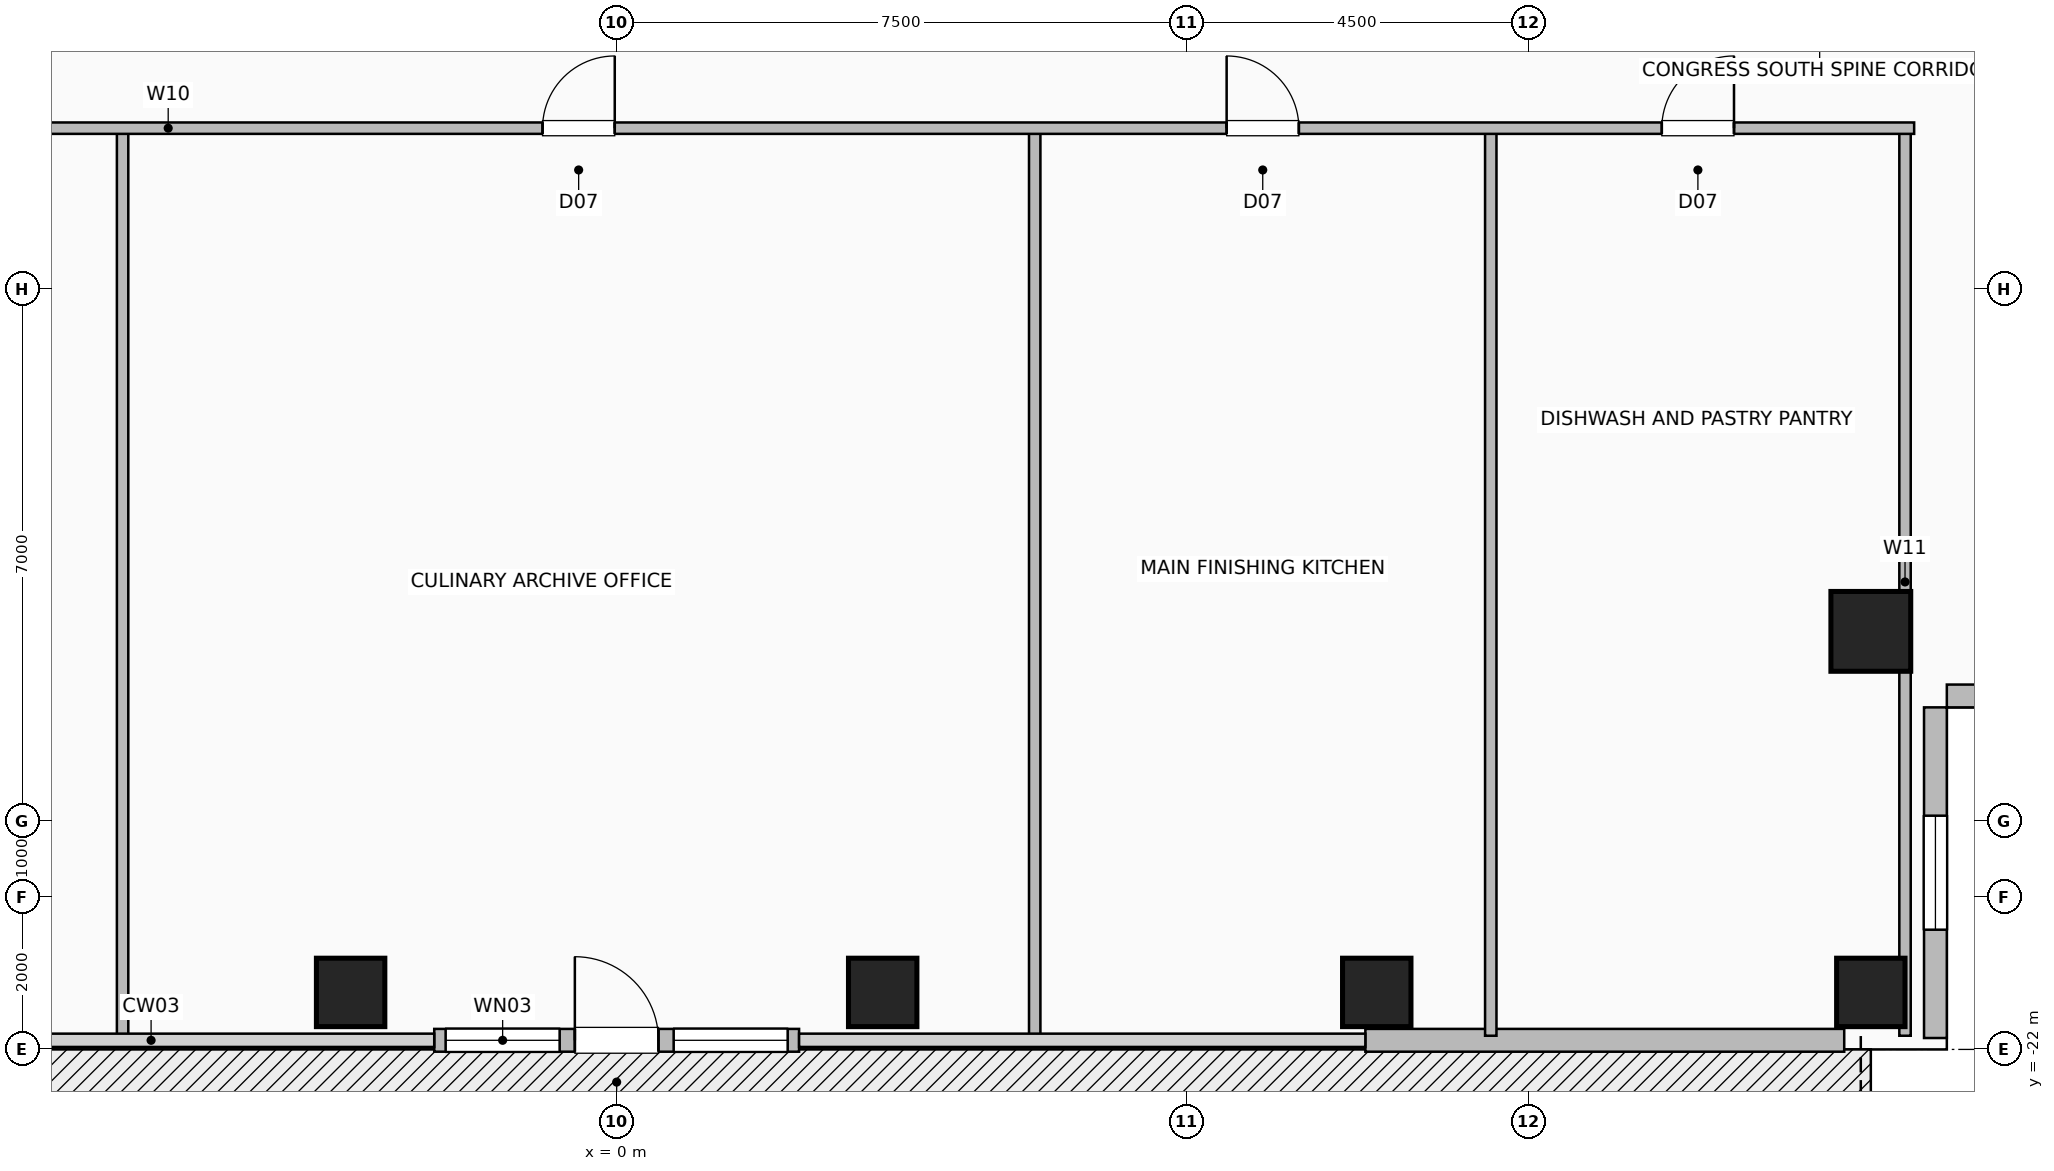
"""IFC4 building model, lengths in metres.
Left out: names, types, materials, properties, quantities, classifications, styles, units other than length and angle.
Written with IfcOpenShell. Run it as: python <this file> out.ifc"""

import sys

from ifc_helpers import new_model, si_unit, direction, frame, frame_2d, origin, origin_2d, place, context, subcontext, project, spatial, rectangle, hollow_rectangle, extrude, element, fill, save


model = new_model("IFC4")
c1 = context("Model", 3, precision=1e-05, world=origin(), true_north=direction((0.0, 1.0)))
c2 = subcontext(c1, "Body", "Model", "MODEL_VIEW")
j1 = project(units=[si_unit("LENGTHUNIT", "METRE"), si_unit("PLANEANGLEUNIT", "RADIAN")], contexts=[c1])
p1 = place(None, origin())
s1 = spatial("IfcSite", under=j1, at=p1, CompositionType="ELEMENT")
p2 = place(p1, origin())
s2 = spatial("IfcBuilding", under=s1, at=p2, CompositionType="ELEMENT")
p3 = place(p2, frame((0.0, 0.0, 122.8)))
s3 = spatial("IfcBuildingStorey", under=s2, at=p3, CompositionType="ELEMENT", Elevation=122.8)
for number, where, z_axis, x_axis in (
    (1, (-3.5, -21.25, 0.0), (0.0, 0.0, 1.0), (1.0, 0.0, 0.0)),
    (2, (3.5, -21.25, 0.0), (0.0, 0.0, 1.0), (1.0, 0.0, 0.0)),
    (3, (10.0, -21.25, 0.0), (0.0, 0.0, 1.0), (1.0, 0.0, 0.0)),
    (4, (16.5, -21.25, 0.0), (0.0, 0.0, 1.0), (1.0, 0.0, 0.0)),
):
    element("IfcColumn", number, at=place(p3, frame(where, z_axis=z_axis, x_axis=x_axis)), inside=s3, PredefinedType="COLUMN", context=c2, shape_type="SweptSolid", body=[
        extrude(hollow_rectangle(XDim=0.9, YDim=0.9, WallThickness=0.045, at=origin_2d()), origin(), (0.0, 0.0, 1.0), 3.6),
    ])
p4 = place(p3, frame((16.5, -16.5, 0.0), z_axis=(0.0, 0.0, 1.0), x_axis=(1.0, 0.0, 0.0)))
e5 = element("IfcColumn", 5, at=p4, inside=s3, PredefinedType="COLUMN", context=c2, shape_type="SweptSolid", body=[
    extrude(hollow_rectangle(XDim=1.05, YDim=1.05, WallThickness=0.05, at=origin_2d()), origin(), (0.0, 0.0, 1.0), 3.6),
])
p5 = place(p3, frame((9.85, -21.88, 0.0), z_axis=(0.0, 0.0, 1.0), x_axis=(1.0, 0.0, 0.0)))
e6 = element("IfcWall", 6, at=p5, inside=s3, PredefinedType="SOLIDWALL", context=c2, shape_type="SweptSolid", body=[
    extrude(rectangle(XDim=6.3, YDim=0.3, at=frame_2d((3.15, 0.0))), origin(), (0.0, 0.0, 1.0), 3.36),
])
p6 = place(p3, frame((-2.4, -21.88, 0.0), z_axis=(0.0, 0.0, 1.0), x_axis=(1.0, 0.0, 0.0)))
e7 = element("IfcWall", 7, at=p6, inside=s3, PredefinedType="SOLIDWALL", context=c2, shape_type="SweptSolid", body=[
    extrude(rectangle(XDim=4.8, YDim=0.3, at=frame_2d((2.4, 0.0))), origin(), (0.0, 0.0, 1.0), 3.36),
])
p7 = place(p6, frame((1.85, 0.0, 0.0)))
e8 = element("IfcOpeningElement", 8, at=p7, cuts=e7, PredefinedType="OPENING", context=c2, shape_type="SweptSolid", body=[
    extrude(rectangle(XDim=1.1, YDim=2.2, at=frame_2d((0.55, 1.1))), frame((0.0, 0.16, 0.0), z_axis=(0.0, -1.0, 0.0), x_axis=(1.0, 0.0, 0.0)), (0.0, 0.0, 1.0), 0.32),
])
p8 = place(p6, frame((0.15, 0.0, 0.85)))
e9 = element("IfcOpeningElement", 9, at=p8, cuts=e7, PredefinedType="OPENING", context=c2, shape_type="SweptSolid", body=[
    extrude(rectangle(XDim=1.5, YDim=1.8, at=frame_2d((0.75, 0.9))), frame((0.0, 0.16, 0.0), z_axis=(0.0, -1.0, 0.0), x_axis=(1.0, 0.0, 0.0)), (0.0, 0.0, 1.0), 0.32),
])
p9 = place(p6, frame((3.15, 0.0, 0.85)))
e10 = element("IfcOpeningElement", 10, at=p9, cuts=e7, PredefinedType="OPENING", context=c2, shape_type="SweptSolid", body=[
    extrude(rectangle(XDim=1.5, YDim=1.8, at=frame_2d((0.75, 0.9))), frame((0.0, 0.16, 0.0), z_axis=(0.0, -1.0, 0.0), x_axis=(1.0, 0.0, 0.0)), (0.0, 0.0, 1.0), 0.32),
])
p10 = place(p3, frame((17.35, -21.85, 0.0), z_axis=(0.0, 0.0, 1.0), x_axis=(0.0, 1.0, 0.0)))
e11 = element("IfcWall", 11, at=p10, inside=s3, PredefinedType="SOLIDWALL", context=c2, shape_type="SweptSolid", body=[
    extrude(rectangle(XDim=4.35, YDim=0.3, at=frame_2d((2.175, 0.0))), origin(), (0.0, 0.0, 1.0), 3.36),
])
p11 = place(p10, frame((1.425, 0.0, 0.9)))
e12 = element("IfcOpeningElement", 12, at=p11, cuts=e11, PredefinedType="OPENING", context=c2, shape_type="SweptSolid", body=[
    extrude(rectangle(XDim=1.5, YDim=1.8, at=frame_2d((0.75, 0.9))), frame((0.0, 0.16, 0.0), z_axis=(0.0, -1.0, 0.0), x_axis=(1.0, 0.0, 0.0)), (0.0, 0.0, 1.0), 0.32),
])
p12 = place(p3, frame((21.85, -17.35, 0.0), z_axis=(0.0, 0.0, 1.0), x_axis=(-1.0, 0.0, 0.0)))
e13 = element("IfcWall", 13, at=p12, inside=s3, PredefinedType="SOLIDWALL", context=c2, shape_type="SweptSolid", body=[
    extrude(rectangle(XDim=4.35, YDim=0.3, at=frame_2d((2.175, 0.0))), origin(), (0.0, 0.0, 1.0), 3.36),
])
for number, where, z_axis, x_axis in (
    (14, (-6.5, -21.82, 0.0), (0.0, 0.0, 1.0), (0.0, 1.0, 0.0)),
    (15, (5.5, -21.82, 0.0), (0.0, 0.0, 1.0), (0.0, 1.0, 0.0)),
    (16, (11.5, -21.82, 0.0), (0.0, 0.0, 1.0), (0.0, 1.0, 0.0)),
    (17, (16.95, -21.82, 0.0), (0.0, 0.0, 1.0), (0.0, 1.0, 0.0)),
):
    element("IfcWall", number, at=place(p3, frame(where, z_axis=z_axis, x_axis=x_axis)), inside=s3, PredefinedType="PARTITIONING", context=c2, shape_type="SweptSolid", body=[
        extrude(rectangle(XDim=11.94, YDim=0.15, at=frame_2d((5.97, 0.0))), origin(), (0.0, 0.0, 1.0), 3.36),
    ])
p13 = place(p3, frame((-17.07, -9.88, 0.0), z_axis=(0.0, 0.0, 1.0), x_axis=(1.0, 0.0, 0.0)))
e18 = element("IfcWall", 18, at=p13, inside=s3, PredefinedType="PARTITIONING", context=c2, shape_type="SweptSolid", body=[
    extrude(rectangle(XDim=34.14, YDim=0.15, at=frame_2d((17.07, 0.0))), origin(), (0.0, 0.0, 1.0), 3.36),
])
p14 = place(p13, frame((4.445, 0.0, 0.0)))
e19 = element("IfcOpeningElement", 19, at=p14, cuts=e18, PredefinedType="OPENING", context=c2, shape_type="SweptSolid", body=[
    extrude(rectangle(XDim=1.8, YDim=2.08, at=frame_2d((0.9, 1.04))), frame((0.0, 0.085, 0.0), z_axis=(0.0, -1.0, 0.0), x_axis=(1.0, 0.0, 0.0)), (0.0, 0.0, 1.0), 0.17),
])
p15 = place(p13, frame((16.095, 0.0, 0.0)))
e20 = element("IfcOpeningElement", 20, at=p15, cuts=e18, PredefinedType="OPENING", context=c2, shape_type="SweptSolid", body=[
    extrude(rectangle(XDim=0.95, YDim=2.06, at=frame_2d((0.475, 1.03))), frame((0.0, 0.085, 0.0), z_axis=(0.0, -1.0, 0.0), x_axis=(1.0, 0.0, 0.0)), (0.0, 0.0, 1.0), 0.17),
])
p16 = place(p13, frame((25.095, 0.0, 0.0)))
e21 = element("IfcOpeningElement", 21, at=p16, cuts=e18, PredefinedType="OPENING", context=c2, shape_type="SweptSolid", body=[
    extrude(rectangle(XDim=0.95, YDim=2.06, at=frame_2d((0.475, 1.03))), frame((0.0, 0.085, 0.0), z_axis=(0.0, -1.0, 0.0), x_axis=(1.0, 0.0, 0.0)), (0.0, 0.0, 1.0), 0.17),
])
p17 = place(p13, frame((30.82, 0.0, 0.0)))
e22 = element("IfcOpeningElement", 22, at=p17, cuts=e18, PredefinedType="OPENING", context=c2, shape_type="SweptSolid", body=[
    extrude(rectangle(XDim=0.95, YDim=2.06, at=frame_2d((0.475, 1.03))), frame((0.0, 0.085, 0.0), z_axis=(0.0, -1.0, 0.0), x_axis=(1.0, 0.0, 0.0)), (0.0, 0.0, 1.0), 0.17),
])
p18 = place(p7, origin())
e23 = element("IfcDoor", 23, at=p18, inside=s3, OperationType="SINGLE_SWING_LEFT", PredefinedType="DOOR", context=c2, shape_type="SweptSolid", body=[
    extrude(rectangle(XDim=1.1, YDim=2.2, at=frame_2d((0.55, 1.1))), frame((0.0, 0.025, 0.0), z_axis=(0.0, -1.0, 0.0), x_axis=(1.0, 0.0, 0.0)), (0.0, 0.0, 1.0), 0.05),
])
fill(e8, e23)
p19 = place(p8, origin())
e24 = element("IfcWindow", 24, at=p19, inside=s3, PartitioningType="SINGLE_PANEL", PredefinedType="WINDOW", context=c2, shape_type="SweptSolid", body=[
    extrude(rectangle(XDim=1.5, YDim=1.8, at=frame_2d((0.75, 0.9))), frame((0.0, 0.03, 0.0), z_axis=(0.0, -1.0, 0.0), x_axis=(1.0, 0.0, 0.0)), (0.0, 0.0, 1.0), 0.06),
])
fill(e9, e24)
p20 = place(p9, origin())
e25 = element("IfcWindow", 25, at=p20, inside=s3, PartitioningType="SINGLE_PANEL", PredefinedType="WINDOW", context=c2, shape_type="SweptSolid", body=[
    extrude(rectangle(XDim=1.5, YDim=1.8, at=frame_2d((0.75, 0.9))), frame((0.0, 0.03, 0.0), z_axis=(0.0, -1.0, 0.0), x_axis=(1.0, 0.0, 0.0)), (0.0, 0.0, 1.0), 0.06),
])
fill(e10, e25)
p21 = place(p11, origin())
e26 = element("IfcWindow", 26, at=p21, inside=s3, PartitioningType="SINGLE_PANEL", PredefinedType="WINDOW", context=c2, shape_type="SweptSolid", body=[
    extrude(rectangle(XDim=1.5, YDim=1.8, at=frame_2d((0.75, 0.9))), frame((0.0, 0.03, 0.0), z_axis=(0.0, -1.0, 0.0), x_axis=(1.0, 0.0, 0.0)), (0.0, 0.0, 1.0), 0.06),
])
fill(e12, e26)
p22 = place(p15, origin())
e27 = element("IfcDoor", 27, at=p22, inside=s3, OperationType="SINGLE_SWING_RIGHT", PredefinedType="DOOR", context=c2, shape_type="SweptSolid", body=[
    extrude(rectangle(XDim=0.95, YDim=2.06, at=frame_2d((0.475, 1.03))), frame((0.0, 0.025, 0.0), z_axis=(0.0, -1.0, 0.0), x_axis=(1.0, 0.0, 0.0)), (0.0, 0.0, 1.0), 0.05),
])
fill(e20, e27)
p23 = place(p16, origin())
e28 = element("IfcDoor", 28, at=p23, inside=s3, OperationType="SINGLE_SWING_LEFT", PredefinedType="DOOR", context=c2, shape_type="SweptSolid", body=[
    extrude(rectangle(XDim=0.95, YDim=2.06, at=frame_2d((0.475, 1.03))), frame((0.0, 0.025, 0.0), z_axis=(0.0, -1.0, 0.0), x_axis=(1.0, 0.0, 0.0)), (0.0, 0.0, 1.0), 0.05),
])
fill(e21, e28)
p24 = place(p17, origin())
e29 = element("IfcDoor", 29, at=p24, inside=s3, OperationType="SINGLE_SWING_RIGHT", PredefinedType="DOOR", context=c2, shape_type="SweptSolid", body=[
    extrude(rectangle(XDim=0.95, YDim=2.06, at=frame_2d((0.475, 1.03))), frame((0.0, 0.025, 0.0), z_axis=(0.0, -1.0, 0.0), x_axis=(1.0, 0.0, 0.0)), (0.0, 0.0, 1.0), 0.05),
])
fill(e22, e29)
save(model, sys.argv[1])
